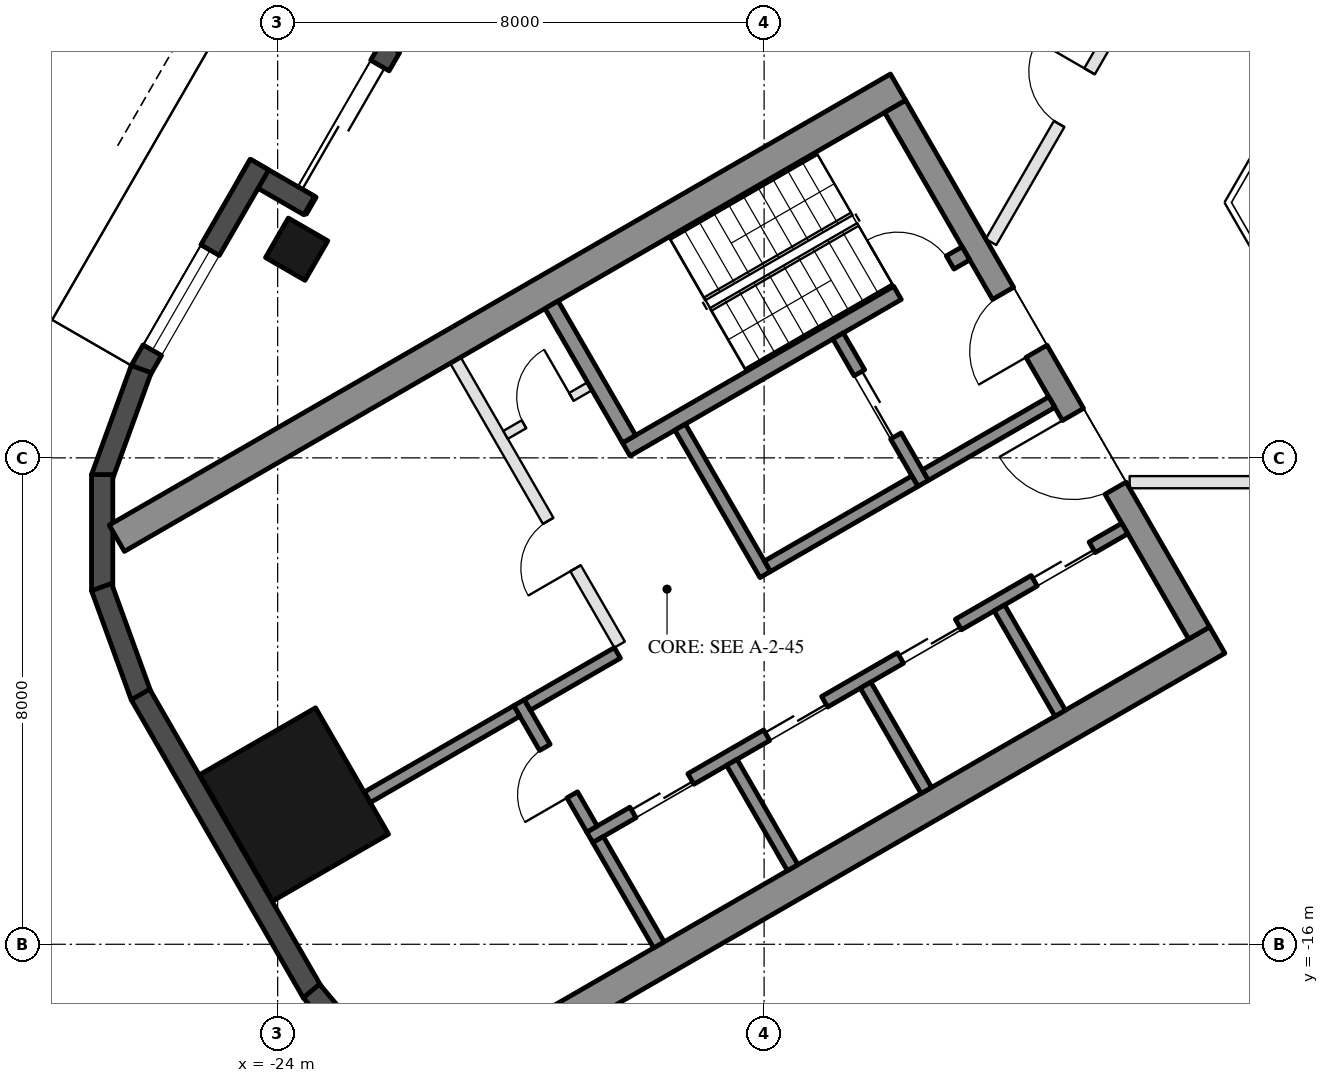
"""IFC4 building model, lengths in metres.
Left out: names, types, materials, properties, quantities, classifications, styles, units other than length and angle.
Written with IfcOpenShell. Run it as: python <this file> out.ifc"""

import sys

from ifc_helpers import new_model, si_unit, direction, frame, frame_2d, origin, origin_2d, place, context, subcontext, project, spatial, rectangle, hollow_rectangle, extrude, element, fill, save


model = new_model("IFC4")
c1 = context("Model", 3, precision=1e-05, world=origin(), true_north=direction((0.0, 1.0)))
c2 = subcontext(c1, "Body", "Model", "MODEL_VIEW")
j1 = project(units=[si_unit("LENGTHUNIT", "METRE"), si_unit("PLANEANGLEUNIT", "RADIAN")], contexts=[c1])
p1 = place(None, origin())
s1 = spatial("IfcSite", under=j1, at=p1, CompositionType="ELEMENT")
p2 = place(p1, origin())
s2 = spatial("IfcBuilding", under=s1, at=p2, CompositionType="ELEMENT")
p3 = place(p2, frame((0.0, 0.0, 194.7)))
s3 = spatial("IfcBuildingStorey", under=s2, at=p3, CompositionType="ELEMENT", Elevation=194.7)
p4 = place(p3, frame((-23.688, -4.568, 0.0), z_axis=(0.0, 0.0, 1.0), x_axis=(0.5, 0.866025403784, 0.0)))
e1 = element("IfcColumn", 1, at=p4, inside=s3, PredefinedType="COLUMN", context=c2, shape_type="SweptSolid", body=[
    extrude(hollow_rectangle(XDim=0.75, YDim=0.75, WallThickness=0.035, at=origin_2d()), origin(), (0.0, 0.0, 1.0), 3.7),
])
p5 = place(p3, frame((-23.729, -13.7, 0.0), z_axis=(0.0, 0.0, 1.0), x_axis=(-0.5, 0.866025403784, 0.0)))
e2 = element("IfcColumn", 2, at=p5, inside=s3, PredefinedType="COLUMN", context=c2, shape_type="SweptSolid", body=[
    extrude(hollow_rectangle(XDim=2.4, YDim=2.2, WallThickness=0.06, at=origin_2d()), origin(), (0.0, 0.0, 1.0), 3.7),
])
p6 = place(p3, frame((-20.309, 1.934, 0.0), z_axis=(0.0, 0.0, 1.0), x_axis=(-0.499992114976, -0.866029956157, 0.0)))
e3 = element("IfcWall", 3, at=p6, inside=s3, PredefinedType="SOLIDWALL", context=c2, shape_type="SweptSolid", body=[
    extrude(rectangle(XDim=6.74, YDim=0.35, at=frame_2d((3.37, 0.0))), origin(), (0.0, 0.0, 1.0), 3.55),
])
p7 = place(p6, frame((4.02, 0.0, 0.0)))
e4 = element("IfcOpeningElement", 4, at=p7, cuts=e3, PredefinedType="OPENING", context=c2, shape_type="SweptSolid", body=[
    extrude(rectangle(XDim=2.4, YDim=2.4, at=frame_2d((1.2, 1.2))), frame((0.0, 0.185, 0.0), z_axis=(0.0, -1.0, 0.0), x_axis=(1.0, 0.0, 0.0)), (0.0, 0.0, 1.0), 0.37),
])
p8 = place(p6, frame((0.77, 0.0, 0.3)))
e5 = element("IfcOpeningElement", 5, at=p8, cuts=e3, PredefinedType="OPENING", context=c2, shape_type="SweptSolid", body=[
    extrude(rectangle(XDim=2.9, YDim=2.65, at=frame_2d((1.45, 1.325))), frame((0.0, 0.185, 0.0), z_axis=(0.0, -1.0, 0.0), x_axis=(1.0, 0.0, 0.0)), (0.0, 0.0, 1.0), 0.37),
])
p9 = place(p3, frame((-23.481, -3.85, 0.0), z_axis=(0.0, 0.0, 1.0), x_axis=(-0.866092288191, 0.499884134912, 0.0)))
e6 = element("IfcWall", 6, at=p9, inside=s3, PredefinedType="SOLIDWALL", context=c2, shape_type="SweptSolid", body=[
    extrude(rectangle(XDim=1.22, YDim=0.35, at=frame_2d((0.61, 0.0))), origin(), (0.0, 0.0, 1.0), 3.55),
])
p10 = place(p3, frame((-24.299, -3.176, 0.0), z_axis=(0.0, 0.0, 1.0), x_axis=(-0.500028278809, -0.866009076391, 0.0)))
e7 = element("IfcWall", 7, at=p10, inside=s3, PredefinedType="SOLIDWALL", context=c2, shape_type="SweptSolid", body=[
    extrude(rectangle(XDim=3.916, YDim=0.35, at=frame_2d((1.958, 0.0))), origin(), (0.0, 0.0, 1.0), 3.55),
])
p11 = place(p10, frame((1.625, 0.0, 0.3)))
e8 = element("IfcOpeningElement", 8, at=p11, cuts=e7, PredefinedType="OPENING", context=c2, shape_type="SweptSolid", body=[
    extrude(rectangle(XDim=1.9, YDim=2.65, at=frame_2d((0.95, 1.325))), frame((0.0, 0.185, 0.0), z_axis=(0.0, -1.0, 0.0), x_axis=(1.0, 0.0, 0.0)), (0.0, 0.0, 1.0), 0.37),
])
for number, where, z_axis, x_axis in (
    (9, (-26.244, -6.54, 0.0), (0.0, 0.0, 1.0), (-0.342, -0.94, 0.0)),
    (10, (-26.886, -8.275, 0.0), (0.0, 0.0, 1.0), (0.0, -1.0, 0.0)),
    (11, (-26.897, -10.125, 0.0), (0.0, 0.0, 1.0), (0.342, -0.94, 0.0)),
):
    element("IfcWall", number, at=place(p3, frame(where, z_axis=z_axis, x_axis=x_axis)), inside=s3, PredefinedType="SOLIDWALL", context=c2, shape_type="SweptSolid", body=[
        extrude(rectangle(XDim=1.91, YDim=0.35, at=frame_2d((0.955, 0.0))), origin(), (0.0, 0.0, 1.0), 3.55),
    ])
p12 = place(p3, frame((-26.257, -11.893, 0.0), z_axis=(0.0, 0.0, 1.0), x_axis=(0.500018773155, -0.866014564827, 0.0)))
e12 = element("IfcWall", 12, at=p12, inside=s3, PredefinedType="SOLIDWALL", context=c2, shape_type="SweptSolid", body=[
    extrude(rectangle(XDim=5.658, YDim=0.35, at=frame_2d((2.829, 0.0))), origin(), (0.0, 0.0, 1.0), 3.55),
])
p13 = place(p3, frame((-23.445, -16.768, 0.0), z_axis=(0.0, 0.0, 1.0), x_axis=(0.642733291068, -0.76609001857, 0.0)))
e13 = element("IfcWall", 13, at=p13, inside=s3, PredefinedType="SOLIDWALL", context=c2, shape_type="SweptSolid", body=[
    extrude(rectangle(XDim=1.91, YDim=0.35, at=frame_2d((0.955, 0.0))), origin(), (0.0, 0.0, 1.0), 3.55),
])
for number, where, z_axis, x_axis in (
    (14, (-13.797, -1.903, 0.0), (0.0, 0.0, 1.0), (-0.866, -0.5, 0.0)),
    (15, (-8.547, -10.997, 0.0), (0.0, 0.0, 1.0), (-0.866, -0.5, 0.0)),
):
    element("IfcWall", number, at=place(p3, frame(where, z_axis=z_axis, x_axis=x_axis)), inside=s3, PredefinedType="SHEAR", context=c2, shape_type="SweptSolid", body=[
        extrude(rectangle(XDim=14.837, YDim=0.5, at=frame_2d((7.418, 0.0))), origin(), (0.0, 0.0, 1.0), 3.5),
    ])
p14 = place(p3, frame((-13.845, -2.22, 0.0), z_axis=(0.0, 0.0, 1.0), x_axis=(0.500004234368, -0.866022959057, 0.0)))
e16 = element("IfcWall", 16, at=p14, inside=s3, PredefinedType="SHEAR", context=c2, shape_type="SweptSolid", body=[
    extrude(rectangle(XDim=10.0, YDim=0.4, at=frame_2d((5.0, 0.0))), origin(), (0.0, 0.0, 1.0), 3.5),
])
p15 = place(p14, frame((3.55, 0.0, 0.0)))
e17 = element("IfcOpeningElement", 17, at=p15, cuts=e16, PredefinedType="OPENING", context=c2, shape_type="SweptSolid", body=[
    extrude(rectangle(XDim=1.1, YDim=2.1, at=frame_2d((0.55, 1.05))), frame((0.0, 0.21, 0.0), z_axis=(0.0, -1.0, 0.0), x_axis=(1.0, 0.0, 0.0)), (0.0, 0.0, 1.0), 0.42),
])
p16 = place(p14, frame((5.85, 0.0, 0.0)))
e18 = element("IfcOpeningElement", 18, at=p16, cuts=e16, PredefinedType="OPENING", context=c2, shape_type="SweptSolid", body=[
    extrude(rectangle(XDim=1.4, YDim=2.1, at=frame_2d((0.7, 1.05))), frame((0.0, 0.21, 0.0), z_axis=(0.0, -1.0, 0.0), x_axis=(1.0, 0.0, 0.0)), (0.0, 0.0, 1.0), 0.42),
])
p17 = place(p3, frame((-12.681, -4.636, 0.0), z_axis=(0.0, 0.0, 1.0), x_axis=(-0.866021702275, -0.500006411147, 0.0)))
e19 = element("IfcWall", 19, at=p17, inside=s3, PredefinedType="SHEAR", context=c2, shape_type="SweptSolid", body=[
    extrude(rectangle(XDim=6.45, YDim=0.25, at=frame_2d((3.225, 0.0))), origin(), (0.0, 0.0, 1.0), 3.5),
])
p18 = place(p17, frame((0.3, 0.0, 0.0)))
e20 = element("IfcOpeningElement", 20, at=p18, cuts=e19, PredefinedType="OPENING", context=c2, shape_type="SweptSolid", body=[
    extrude(rectangle(XDim=1.0, YDim=2.1, at=frame_2d((0.5, 1.05))), frame((0.0, 0.135, 0.0), z_axis=(0.0, -1.0, 0.0), x_axis=(1.0, 0.0, 0.0)), (0.0, 0.0, 1.0), 0.27),
])
p19 = place(p3, frame((-19.496, -5.482, 0.0), z_axis=(0.0, 0.0, 1.0), x_axis=(0.499990435942, -0.866030925526, 0.0)))
e21 = element("IfcWall", 21, at=p19, inside=s3, PredefinedType="SHEAR", context=c2, shape_type="SweptSolid", body=[
    extrude(rectangle(XDim=2.55, YDim=0.25, at=frame_2d((1.275, 0.0))), origin(), (0.0, 0.0, 1.0), 3.5),
])
p20 = place(p3, frame((-17.381, -7.495, 0.0), z_axis=(0.0, 0.0, 1.0), x_axis=(0.500011755427, -0.866018616679, 0.0)))
e22 = element("IfcWall", 22, at=p20, inside=s3, PredefinedType="SHEAR", context=c2, shape_type="SweptSolid", body=[
    extrude(rectangle(XDim=2.8, YDim=0.2, at=frame_2d((1.4, 0.0))), origin(), (0.0, 0.0, 1.0), 3.5),
])
p21 = place(p3, frame((-14.783, -5.995, 0.0), z_axis=(0.0, 0.0, 1.0), x_axis=(0.49994636267, -0.866056369097, 0.0)))
e23 = element("IfcWall", 23, at=p21, inside=s3, PredefinedType="SHEAR", context=c2, shape_type="SweptSolid", body=[
    extrude(rectangle(XDim=2.8, YDim=0.2, at=frame_2d((1.4, 0.0))), origin(), (0.0, 0.0, 1.0), 3.5),
])
p22 = place(p21, frame((0.7, 0.0, 0.0)))
e24 = element("IfcOpeningElement", 24, at=p22, cuts=e23, PredefinedType="OPENING", context=c2, shape_type="SweptSolid", body=[
    extrude(rectangle(XDim=1.2, YDim=2.1, at=frame_2d((0.6, 1.05))), frame((0.0, 0.11, 0.0), z_axis=(0.0, -1.0, 0.0), x_axis=(1.0, 0.0, 0.0)), (0.0, 0.0, 1.0), 0.22),
])
p23 = place(p3, frame((-13.52, -8.383, 0.0), z_axis=(0.0, 0.0, 1.0), x_axis=(-0.866034573852, -0.49998411664, 0.0)))
e25 = element("IfcWall", 25, at=p23, inside=s3, PredefinedType="SHEAR", context=c2, shape_type="SweptSolid", body=[
    extrude(rectangle(XDim=2.8, YDim=0.2, at=frame_2d((1.4, 0.0))), origin(), (0.0, 0.0, 1.0), 3.5),
])
p24 = place(p3, frame((-11.268, -7.083, 0.0), z_axis=(0.0, 0.0, 1.0), x_axis=(-0.866050077142, -0.499957262057, 0.0)))
e26 = element("IfcWall", 26, at=p24, inside=s3, PredefinedType="SHEAR", context=c2, shape_type="SweptSolid", body=[
    extrude(rectangle(XDim=2.4, YDim=0.2, at=frame_2d((1.2, 0.0))), origin(), (0.0, 0.0, 1.0), 3.5),
])
p25 = place(p3, frame((-10.068, -9.162, 0.0), z_axis=(0.0, 0.0, 1.0), x_axis=(-0.866032725843, -0.499987317609, 0.0)))
e27 = element("IfcWall", 27, at=p25, inside=s3, PredefinedType="SHEAR", context=c2, shape_type="SweptSolid", body=[
    extrude(rectangle(XDim=10.16, YDim=0.2, at=frame_2d((5.08, 0.0))), origin(), (0.0, 0.0, 1.0), 3.5),
])
p26 = place(p25, frame((0.62, 0.0, 0.0)))
e28 = element("IfcOpeningElement", 28, at=p26, cuts=e27, PredefinedType="OPENING", context=c2, shape_type="SweptSolid", body=[
    extrude(rectangle(XDim=1.1, YDim=2.1, at=frame_2d((0.55, 1.05))), frame((0.0, 0.11, 0.0), z_axis=(0.0, -1.0, 0.0), x_axis=(1.0, 0.0, 0.0)), (0.0, 0.0, 1.0), 0.22),
])
p27 = place(p25, frame((3.16, 0.0, 0.0)))
e29 = element("IfcOpeningElement", 29, at=p27, cuts=e27, PredefinedType="OPENING", context=c2, shape_type="SweptSolid", body=[
    extrude(rectangle(XDim=1.1, YDim=2.1, at=frame_2d((0.55, 1.05))), frame((0.0, 0.11, 0.0), z_axis=(0.0, -1.0, 0.0), x_axis=(1.0, 0.0, 0.0)), (0.0, 0.0, 1.0), 0.22),
])
p28 = place(p25, frame((5.7, 0.0, 0.0)))
e30 = element("IfcOpeningElement", 30, at=p28, cuts=e27, PredefinedType="OPENING", context=c2, shape_type="SweptSolid", body=[
    extrude(rectangle(XDim=1.1, YDim=2.1, at=frame_2d((0.55, 1.05))), frame((0.0, 0.11, 0.0), z_axis=(0.0, -1.0, 0.0), x_axis=(1.0, 0.0, 0.0)), (0.0, 0.0, 1.0), 0.22),
])
p29 = place(p25, frame((8.24, 0.0, 0.0)))
e31 = element("IfcOpeningElement", 31, at=p29, cuts=e27, PredefinedType="OPENING", context=c2, shape_type="SweptSolid", body=[
    extrude(rectangle(XDim=1.1, YDim=2.1, at=frame_2d((0.55, 1.05))), frame((0.0, 0.11, 0.0), z_axis=(0.0, -1.0, 0.0), x_axis=(1.0, 0.0, 0.0)), (0.0, 0.0, 1.0), 0.22),
])
p30 = place(p3, frame((-20.031, -12.026, 0.0), z_axis=(0.0, 0.0, 1.0), x_axis=(0.500033551112, -0.866006032174, 0.0)))
e32 = element("IfcWall", 32, at=p30, inside=s3, PredefinedType="SHEAR", context=c2, shape_type="SweptSolid", body=[
    extrude(rectangle(XDim=2.4, YDim=0.2, at=frame_2d((1.2, 0.0))), origin(), (0.0, 0.0, 1.0), 3.5),
])
p31 = place(p30, frame((0.85, 0.0, 0.0)))
e33 = element("IfcOpeningElement", 33, at=p31, cuts=e32, PredefinedType="OPENING", context=c2, shape_type="SweptSolid", body=[
    extrude(rectangle(XDim=0.9, YDim=2.1, at=frame_2d((0.45, 1.05))), frame((0.0, 0.11, 0.0), z_axis=(0.0, -1.0, 0.0), x_axis=(1.0, 0.0, 0.0)), (0.0, 0.0, 1.0), 0.22),
])
p32 = place(p3, frame((-18.413, -11.208, 0.0), z_axis=(0.0, 0.0, 1.0), x_axis=(-0.866038183914, -0.499977863513, 0.0)))
e34 = element("IfcWall", 34, at=p32, inside=s3, PredefinedType="SHEAR", context=c2, shape_type="SweptSolid", body=[
    extrude(rectangle(XDim=1.71, YDim=0.2, at=frame_2d((0.855, 0.0))), origin(), (0.0, 0.0, 1.0), 3.5),
])
for number, where, z_axis, x_axis in (
    (35, (-12.131, -10.468, 0.0), (0.0, 0.0, 1.0), (0.5, -0.866, 0.0)),
    (36, (-14.331, -11.738, 0.0), (0.0, 0.0, 1.0), (0.5, -0.866, 0.0)),
    (37, (-16.531, -13.008, 0.0), (0.0, 0.0, 1.0), (0.5, -0.866, 0.0)),
    (38, (-18.73, -14.278, 0.0), (0.0, 0.0, 1.0), (0.5, -0.866, 0.0)),
):
    element("IfcWall", number, at=place(p3, frame(where, z_axis=z_axis, x_axis=x_axis)), inside=s3, PredefinedType="SHEAR", context=c2, shape_type="SweptSolid", body=[
        extrude(rectangle(XDim=2.0, YDim=0.2, at=frame_2d((1.0, 0.0))), origin(), (0.0, 0.0, 1.0), 3.5),
    ])
p33 = place(p3, frame((-20.067, -12.163, 0.0), z_axis=(0.0, 0.0, 1.0), x_axis=(-0.866055327414, -0.49994816717, 0.0)))
e39 = element("IfcWall", 39, at=p33, inside=s3, PredefinedType="SHEAR", context=c2, shape_type="SweptSolid", body=[
    extrude(rectangle(XDim=2.84, YDim=0.2, at=frame_2d((1.42, 0.0))), origin(), (0.0, 0.0, 1.0), 3.5),
])
p34 = place(p3, frame((-21.076, -6.395, 0.0), z_axis=(0.0, 0.0, 1.0), x_axis=(0.50001468107, -0.866016927499, 0.0)))
e40 = element("IfcWall", 40, at=p34, inside=s3, PredefinedType="PARTITIONING", context=c2, shape_type="SweptSolid", body=[
    extrude(rectangle(XDim=5.4, YDim=0.2, at=frame_2d((2.7, 0.0))), origin(), (0.0, 0.0, 1.0), 3.5),
])
p35 = place(p34, frame((3.05, 0.0, 0.0)))
e41 = element("IfcOpeningElement", 41, at=p35, cuts=e40, PredefinedType="OPENING", context=c2, shape_type="SweptSolid", body=[
    extrude(rectangle(XDim=0.9, YDim=2.1, at=frame_2d((0.45, 1.05))), frame((0.0, 0.11, 0.0), z_axis=(0.0, -1.0, 0.0), x_axis=(1.0, 0.0, 0.0)), (0.0, 0.0, 1.0), 0.22),
])
p36 = place(p3, frame((-18.866, -6.822, 0.0), z_axis=(0.0, 0.0, 1.0), x_axis=(-0.866028054938, -0.499995408039, 0.0)))
e42 = element("IfcWall", 42, at=p36, inside=s3, PredefinedType="PARTITIONING", context=c2, shape_type="SweptSolid", body=[
    extrude(rectangle(XDim=1.6, YDim=0.15, at=frame_2d((0.8, 0.0))), origin(), (0.0, 0.0, 1.0), 3.5),
])
p37 = place(p36, frame((0.35, 0.0, 0.0)))
e43 = element("IfcOpeningElement", 43, at=p37, cuts=e42, PredefinedType="OPENING", context=c2, shape_type="SweptSolid", body=[
    extrude(rectangle(XDim=0.9, YDim=2.1, at=frame_2d((0.45, 1.05))), frame((0.0, 0.085, 0.0), z_axis=(0.0, -1.0, 0.0), x_axis=(1.0, 0.0, 0.0)), (0.0, 0.0, 1.0), 0.17),
])
p38 = place(p3, frame((-1.302, -8.4, 0.0), z_axis=(0.0, 0.0, 1.0), x_axis=(-1.0, 0.0, 0.0)))
e44 = element("IfcWall", 44, at=p38, inside=s3, PredefinedType="PARTITIONING", context=c2, shape_type="SweptSolid", body=[
    extrude(rectangle(XDim=8.686, YDim=0.2, at=frame_2d((4.343, 0.0))), origin(), (0.0, 0.0, 1.0), 2.95),
])
p39 = place(p38, frame((3.843, 0.0, 0.0)))
e45 = element("IfcOpeningElement", 45, at=p39, cuts=e44, PredefinedType="OPENING", context=c2, shape_type="SweptSolid", body=[
    extrude(rectangle(XDim=1.0, YDim=2.1, at=frame_2d((0.5, 1.05))), frame((0.0, 0.11, 0.0), z_axis=(0.0, -1.0, 0.0), x_axis=(1.0, 0.0, 0.0)), (0.0, 0.0, 1.0), 0.22),
])
p40 = place(p3, frame((-12.269, -4.45, 0.0), z_axis=(0.0, 0.0, 1.0), x_axis=(0.500026884667, 0.866009881359, 0.0)))
e46 = element("IfcWall", 46, at=p40, inside=s3, PredefinedType="PARTITIONING", context=c2, shape_type="SweptSolid", body=[
    extrude(rectangle(XDim=5.484, YDim=0.2, at=frame_2d((2.742, 0.0))), origin(), (0.0, 0.0, 1.0), 2.95),
])
p41 = place(p40, frame((2.242, 0.0, 0.0)))
e47 = element("IfcOpeningElement", 47, at=p41, cuts=e46, PredefinedType="OPENING", context=c2, shape_type="SweptSolid", body=[
    extrude(rectangle(XDim=1.0, YDim=2.1, at=frame_2d((0.5, 1.05))), frame((0.0, 0.11, 0.0), z_axis=(0.0, -1.0, 0.0), x_axis=(1.0, 0.0, 0.0)), (0.0, 0.0, 1.0), 0.22),
])
p42 = place(p7, frame((2.4, 0.0, 0.0), z_axis=(0.0, 0.0, 1.0), x_axis=(-1.0, 0.0, 0.0)))
e48 = element("IfcDoor", 48, at=p42, inside=s3, OperationType="SLIDING_TO_LEFT", PredefinedType="DOOR", context=c2, shape_type="SweptSolid", body=[
    extrude(rectangle(XDim=2.4, YDim=2.4, at=frame_2d((1.2, 1.2))), frame((0.0, 0.025, 0.0), z_axis=(0.0, -1.0, 0.0), x_axis=(1.0, 0.0, 0.0)), (0.0, 0.0, 1.0), 0.05),
])
fill(e4, e48)
p43 = place(p11, origin())
e49 = element("IfcWindow", 49, at=p43, inside=s3, PartitioningType="SINGLE_PANEL", PredefinedType="WINDOW", context=c2, shape_type="SweptSolid", body=[
    extrude(rectangle(XDim=1.9, YDim=2.65, at=frame_2d((0.95, 1.325))), frame((0.0, 0.03, 0.0), z_axis=(0.0, -1.0, 0.0), x_axis=(1.0, 0.0, 0.0)), (0.0, 0.0, 1.0), 0.06),
])
fill(e8, e49)
p44 = place(p22, origin())
e50 = element("IfcDoor", 50, at=p44, inside=s3, OperationType="DOUBLE_DOOR_SLIDING", PredefinedType="DOOR", context=c2, shape_type="SweptSolid", body=[
    extrude(rectangle(XDim=1.2, YDim=2.1, at=frame_2d((0.6, 1.05))), frame((0.0, 0.025, 0.0), z_axis=(0.0, -1.0, 0.0), x_axis=(1.0, 0.0, 0.0)), (0.0, 0.0, 1.0), 0.05),
])
fill(e24, e50)
p45 = place(p37, frame((0.9, 0.0, 0.0), z_axis=(0.0, 0.0, 1.0), x_axis=(-1.0, 0.0, 0.0)))
e51 = element("IfcDoor", 51, at=p45, inside=s3, OperationType="SINGLE_SWING_RIGHT", PredefinedType="DOOR", context=c2, shape_type="SweptSolid", body=[
    extrude(rectangle(XDim=0.9, YDim=2.1, at=frame_2d((0.45, 1.05))), frame((0.0, 0.025, 0.0), z_axis=(0.0, -1.0, 0.0), x_axis=(1.0, 0.0, 0.0)), (0.0, 0.0, 1.0), 0.05),
])
fill(e43, e51)
p46 = place(p26, origin())
e52 = element("IfcDoor", 52, at=p46, inside=s3, OperationType="DOUBLE_DOOR_SLIDING", PredefinedType="DOOR", context=c2, shape_type="SweptSolid", body=[
    extrude(rectangle(XDim=1.1, YDim=2.1, at=frame_2d((0.55, 1.05))), frame((0.0, 0.025, 0.0), z_axis=(0.0, -1.0, 0.0), x_axis=(1.0, 0.0, 0.0)), (0.0, 0.0, 1.0), 0.05),
])
fill(e28, e52)
p47 = place(p27, origin())
e53 = element("IfcDoor", 53, at=p47, inside=s3, OperationType="DOUBLE_DOOR_SLIDING", PredefinedType="DOOR", context=c2, shape_type="SweptSolid", body=[
    extrude(rectangle(XDim=1.1, YDim=2.1, at=frame_2d((0.55, 1.05))), frame((0.0, 0.025, 0.0), z_axis=(0.0, -1.0, 0.0), x_axis=(1.0, 0.0, 0.0)), (0.0, 0.0, 1.0), 0.05),
])
fill(e29, e53)
p48 = place(p28, origin())
e54 = element("IfcDoor", 54, at=p48, inside=s3, OperationType="DOUBLE_DOOR_SLIDING", PredefinedType="DOOR", context=c2, shape_type="SweptSolid", body=[
    extrude(rectangle(XDim=1.1, YDim=2.1, at=frame_2d((0.55, 1.05))), frame((0.0, 0.025, 0.0), z_axis=(0.0, -1.0, 0.0), x_axis=(1.0, 0.0, 0.0)), (0.0, 0.0, 1.0), 0.05),
])
fill(e30, e54)
p49 = place(p29, origin())
e55 = element("IfcDoor", 55, at=p49, inside=s3, OperationType="DOUBLE_DOOR_SLIDING", PredefinedType="DOOR", context=c2, shape_type="SweptSolid", body=[
    extrude(rectangle(XDim=1.1, YDim=2.1, at=frame_2d((0.55, 1.05))), frame((0.0, 0.025, 0.0), z_axis=(0.0, -1.0, 0.0), x_axis=(1.0, 0.0, 0.0)), (0.0, 0.0, 1.0), 0.05),
])
fill(e31, e55)
p50 = place(p31, frame((0.9, 0.0, 0.0), z_axis=(0.0, 0.0, 1.0), x_axis=(-1.0, 0.0, 0.0)))
e56 = element("IfcDoor", 56, at=p50, inside=s3, OperationType="SINGLE_SWING_LEFT", PredefinedType="DOOR", context=c2, shape_type="SweptSolid", body=[
    extrude(rectangle(XDim=0.9, YDim=2.1, at=frame_2d((0.45, 1.05))), frame((0.0, 0.025, 0.0), z_axis=(0.0, -1.0, 0.0), x_axis=(1.0, 0.0, 0.0)), (0.0, 0.0, 1.0), 0.05),
])
fill(e33, e56)
p51 = place(p35, frame((0.9, 0.0, 0.0), z_axis=(0.0, 0.0, 1.0), x_axis=(-1.0, 0.0, 0.0)))
e57 = element("IfcDoor", 57, at=p51, inside=s3, OperationType="SINGLE_SWING_LEFT", PredefinedType="DOOR", context=c2, shape_type="SweptSolid", body=[
    extrude(rectangle(XDim=0.9, YDim=2.1, at=frame_2d((0.45, 1.05))), frame((0.0, 0.025, 0.0), z_axis=(0.0, -1.0, 0.0), x_axis=(1.0, 0.0, 0.0)), (0.0, 0.0, 1.0), 0.05),
])
fill(e41, e57)
p52 = place(p15, frame((1.1, 0.0, 0.0), z_axis=(0.0, 0.0, 1.0), x_axis=(-1.0, 0.0, 0.0)))
e58 = element("IfcDoor", 58, at=p52, inside=s3, OperationType="SINGLE_SWING_LEFT", PredefinedType="DOOR", context=c2, shape_type="SweptSolid", body=[
    extrude(rectangle(XDim=1.1, YDim=2.1, at=frame_2d((0.55, 1.05))), frame((0.0, 0.025, 0.0), z_axis=(0.0, -1.0, 0.0), x_axis=(1.0, 0.0, 0.0)), (0.0, 0.0, 1.0), 0.05),
])
fill(e17, e58)
p53 = place(p16, frame((1.4, 0.0, 0.0), z_axis=(0.0, 0.0, 1.0), x_axis=(-1.0, 0.0, 0.0)))
e59 = element("IfcDoor", 59, at=p53, inside=s3, OperationType="DOUBLE_DOOR_SINGLE_SWING", PredefinedType="DOOR", context=c2, shape_type="SweptSolid", body=[
    extrude(rectangle(XDim=1.4, YDim=2.1, at=frame_2d((0.7, 1.05))), frame((0.0, 0.025, 0.0), z_axis=(0.0, -1.0, 0.0), x_axis=(1.0, 0.0, 0.0)), (0.0, 0.0, 1.0), 0.05),
])
fill(e18, e59)
p54 = place(p18, frame((1.0, 0.0, 0.0), z_axis=(0.0, 0.0, 1.0), x_axis=(-1.0, 0.0, 0.0)))
e60 = element("IfcDoor", 60, at=p54, inside=s3, OperationType="SINGLE_SWING_LEFT", PredefinedType="DOOR", context=c2, shape_type="SweptSolid", body=[
    extrude(rectangle(XDim=1.0, YDim=2.1, at=frame_2d((0.5, 1.05))), frame((0.0, 0.025, 0.0), z_axis=(0.0, -1.0, 0.0), x_axis=(1.0, 0.0, 0.0)), (0.0, 0.0, 1.0), 0.05),
])
fill(e20, e60)
p55 = place(p41, origin())
e61 = element("IfcDoor", 61, at=p55, inside=s3, OperationType="SINGLE_SWING_RIGHT", PredefinedType="DOOR", context=c2, shape_type="SweptSolid", body=[
    extrude(rectangle(XDim=1.0, YDim=2.1, at=frame_2d((0.5, 1.05))), frame((0.0, 0.025, 0.0), z_axis=(0.0, -1.0, 0.0), x_axis=(1.0, 0.0, 0.0)), (0.0, 0.0, 1.0), 0.05),
])
fill(e47, e61)
save(model, sys.argv[1])
